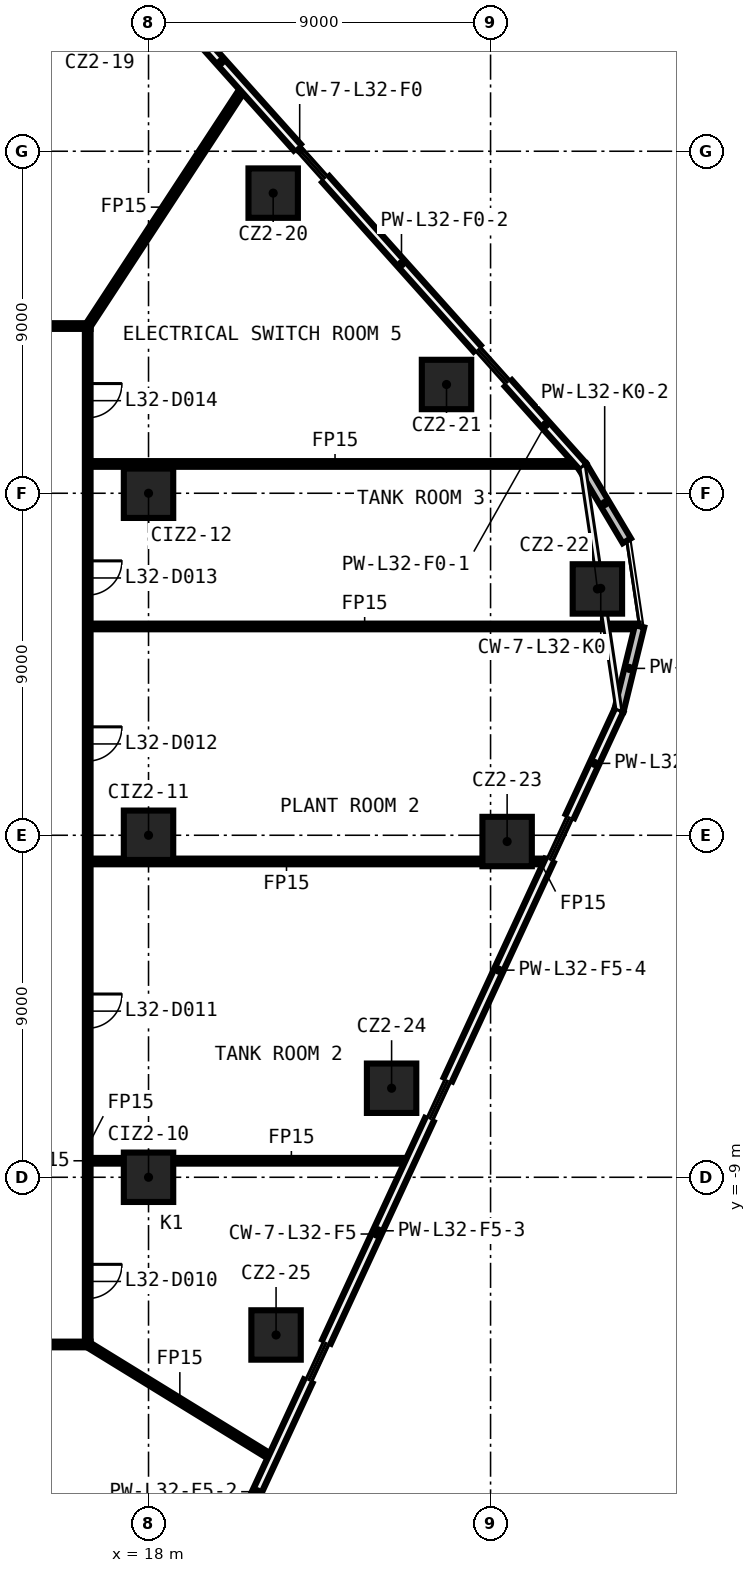
"""IFC4 building model, lengths in metres.
Left out: names, types, materials, properties, quantities, classifications, styles, units other than length and angle.
Written with IfcOpenShell. Run it as: python <this file> out.ifc"""

import sys

from ifc_helpers import new_model, si_unit, direction, frame, frame_2d, origin, origin_2d, place, context, subcontext, project, spatial, rectangle, extrude, element, fill, save


model = new_model("IFC4")
c1 = context("Model", 3, precision=1e-05, world=origin(), true_north=direction((0.0, 1.0)))
c2 = subcontext(c1, "Body", "Model", "MODEL_VIEW")
j1 = project(units=[si_unit("LENGTHUNIT", "METRE"), si_unit("PLANEANGLEUNIT", "RADIAN")], contexts=[c1])
p1 = place(None, origin())
s1 = spatial("IfcSite", under=j1, at=p1, CompositionType="ELEMENT")
p2 = place(p1, origin())
s2 = spatial("IfcBuilding", under=s1, at=p2, CompositionType="ELEMENT")
p3 = place(p2, frame((0.0, 0.0, 145.6)))
s3 = spatial("IfcBuildingStorey", under=s2, at=p3, CompositionType="ELEMENT", Elevation=145.6)
for number, where, z_axis, x_axis in (
    (1, (21.28, 16.898, 0.0), (0.0, 0.0, 1.0), (1.0, 0.0, 0.0)),
    (2, (25.841, 11.862, 0.0), (0.0, 0.0, 1.0), (1.0, 0.0, 0.0)),
    (3, (29.811, 6.482, 0.0), (0.0, 0.0, 1.0), (1.0, 0.0, 0.0)),
    (4, (27.436, -0.165, 0.0), (0.0, 0.0, 1.0), (1.0, 0.0, 0.0)),
    (5, (24.396, -6.657, 0.0), (0.0, 0.0, 1.0), (1.0, 0.0, 0.0)),
    (6, (21.356, -13.15, 0.0), (0.0, 0.0, 1.0), (1.0, 0.0, 0.0)),
    (7, (18.0, -9.0, 0.0), (0.0, 0.0, 1.0), (1.0, 0.0, 0.0)),
    (8, (18.0, 0.0, 0.0), (0.0, 0.0, 1.0), (1.0, 0.0, 0.0)),
    (9, (18.0, 9.0, 0.0), (0.0, 0.0, 1.0), (1.0, 0.0, 0.0)),
):
    element("IfcColumn", number, at=place(p3, frame(where, z_axis=z_axis, x_axis=x_axis)), inside=s3, PredefinedType="COLUMN", context=c2, shape_type="SweptSolid", body=[
        extrude(rectangle(XDim=1.3, YDim=1.3, at=origin_2d()), origin(), (0.0, 0.0, 1.0), 5.55),
    ])
p4 = place(p3, frame((16.475, -13.4, 0.0), z_axis=(0.0, 0.0, 1.0), x_axis=(-1.0, 0.0, 0.0)))
e10 = element("IfcWall", 10, at=p4, inside=s3, PredefinedType="PARTITIONING", context=c2, shape_type="SweptSolid", body=[
    extrude(rectangle(XDim=32.95, YDim=0.15, at=frame_2d((16.475, 0.0))), origin(), (0.0, 0.0, 1.0), 5.55),
])
p5 = place(p4, frame((29.678, 0.0, 0.0)))
e11 = element("IfcOpeningElement", 11, at=p5, cuts=e10, PredefinedType="OPENING", context=c2, shape_type="SweptSolid", body=[
    extrude(rectangle(XDim=0.9, YDim=2.1, at=frame_2d((0.45, 1.05))), frame((0.0, 0.085, 0.0), z_axis=(0.0, -1.0, 0.0), x_axis=(1.0, 0.0, 0.0)), (0.0, 0.0, 1.0), 0.17),
])
p6 = place(p4, frame((23.632, 0.0, 0.0)))
e12 = element("IfcOpeningElement", 12, at=p6, cuts=e10, PredefinedType="OPENING", context=c2, shape_type="SweptSolid", body=[
    extrude(rectangle(XDim=0.9, YDim=2.1, at=frame_2d((0.45, 1.05))), frame((0.0, 0.085, 0.0), z_axis=(0.0, -1.0, 0.0), x_axis=(1.0, 0.0, 0.0)), (0.0, 0.0, 1.0), 0.17),
])
p7 = place(p4, frame((19.232, 0.0, 0.0)))
e13 = element("IfcOpeningElement", 13, at=p7, cuts=e10, PredefinedType="OPENING", context=c2, shape_type="SweptSolid", body=[
    extrude(rectangle(XDim=0.9, YDim=2.1, at=frame_2d((0.45, 1.05))), frame((0.0, 0.085, 0.0), z_axis=(0.0, -1.0, 0.0), x_axis=(1.0, 0.0, 0.0)), (0.0, 0.0, 1.0), 0.17),
])
p8 = place(p4, frame((14.831, 0.0, 0.0)))
e14 = element("IfcOpeningElement", 14, at=p8, cuts=e10, PredefinedType="OPENING", context=c2, shape_type="SweptSolid", body=[
    extrude(rectangle(XDim=0.9, YDim=2.1, at=frame_2d((0.45, 1.05))), frame((0.0, 0.085, 0.0), z_axis=(0.0, -1.0, 0.0), x_axis=(1.0, 0.0, 0.0)), (0.0, 0.0, 1.0), 0.17),
])
p9 = place(p4, frame((10.43, 0.0, 0.0)))
e15 = element("IfcOpeningElement", 15, at=p9, cuts=e10, PredefinedType="OPENING", context=c2, shape_type="SweptSolid", body=[
    extrude(rectangle(XDim=0.9, YDim=2.1, at=frame_2d((0.45, 1.05))), frame((0.0, 0.085, 0.0), z_axis=(0.0, -1.0, 0.0), x_axis=(1.0, 0.0, 0.0)), (0.0, 0.0, 1.0), 0.17),
])
p10 = place(p4, frame((3.944, 0.0, 0.0)))
e16 = element("IfcOpeningElement", 16, at=p10, cuts=e10, PredefinedType="OPENING", context=c2, shape_type="SweptSolid", body=[
    extrude(rectangle(XDim=0.9, YDim=2.1, at=frame_2d((0.45, 1.05))), frame((0.0, 0.085, 0.0), z_axis=(0.0, -1.0, 0.0), x_axis=(1.0, 0.0, 0.0)), (0.0, 0.0, 1.0), 0.17),
])
p11 = place(p3, frame((16.475, -8.566, 0.0), z_axis=(0.0, 0.0, 1.0), x_axis=(1.0, 0.0, 0.0)))
e17 = element("IfcWall", 17, at=p11, inside=s3, PredefinedType="PARTITIONING", context=c2, shape_type="SweptSolid", body=[
    extrude(rectangle(XDim=0.875, YDim=0.15, at=frame_2d((0.438, 0.0))), origin(), (0.0, 0.0, 1.0), 5.55),
])
p12 = place(p3, frame((18.65, -8.566, 0.0), z_axis=(0.0, 0.0, 1.0), x_axis=(1.0, 0.0, 0.0)))
e18 = element("IfcWall", 18, at=p12, inside=s3, PredefinedType="PARTITIONING", context=c2, shape_type="SweptSolid", body=[
    extrude(rectangle(XDim=6.218, YDim=0.15, at=frame_2d((3.109, 0.0))), origin(), (0.0, 0.0, 1.0), 5.55),
])
p13 = place(p3, frame((16.475, -0.689, 0.0), z_axis=(0.0, 0.0, 1.0), x_axis=(1.0, 0.0, 0.0)))
e19 = element("IfcWall", 19, at=p13, inside=s3, PredefinedType="PARTITIONING", context=c2, shape_type="SweptSolid", body=[
    extrude(rectangle(XDim=10.311, YDim=0.15, at=frame_2d((5.155, 0.0))), origin(), (0.0, 0.0, 1.0), 5.55),
])
p14 = place(p3, frame((28.086, -0.689, 0.0), z_axis=(0.0, 0.0, 1.0), x_axis=(1.0, 0.0, 0.0)))
e20 = element("IfcWall", 20, at=p14, inside=s3, PredefinedType="PARTITIONING", context=c2, shape_type="SweptSolid", body=[
    extrude(rectangle(XDim=0.431, YDim=0.15, at=frame_2d((0.215, 0.0))), origin(), (0.0, 0.0, 1.0), 5.55),
])
p15 = place(p3, frame((16.475, 5.495, 0.0), z_axis=(0.0, 0.0, 1.0), x_axis=(1.0, 0.0, 0.0)))
e21 = element("IfcWall", 21, at=p15, inside=s3, PredefinedType="PARTITIONING", context=c2, shape_type="SweptSolid", body=[
    extrude(rectangle(XDim=14.424, YDim=0.15, at=frame_2d((7.212, 0.0))), origin(), (0.0, 0.0, 1.0), 5.55),
])
p16 = place(p3, frame((16.475, 9.771, 0.0), z_axis=(0.0, 0.0, 1.0), x_axis=(1.0, 0.0, 0.0)))
e22 = element("IfcWall", 22, at=p16, inside=s3, PredefinedType="PARTITIONING", context=c2, shape_type="SweptSolid", body=[
    extrude(rectangle(XDim=12.865, YDim=0.15, at=frame_2d((6.432, 0.0))), origin(), (0.0, 0.0, 1.0), 5.55),
])
p17 = place(p3, frame((-16.475, 13.4, 0.0), z_axis=(0.0, 0.0, 1.0), x_axis=(1.0, 0.0, 0.0)))
e23 = element("IfcWall", 23, at=p17, inside=s3, PredefinedType="PARTITIONING", context=c2, shape_type="SweptSolid", body=[
    extrude(rectangle(XDim=32.95, YDim=0.15, at=frame_2d((16.475, 0.0))), origin(), (0.0, 0.0, 1.0), 5.55),
])
p18 = place(p17, frame((30.036, 0.0, 0.0)))
e24 = element("IfcOpeningElement", 24, at=p18, cuts=e23, PredefinedType="OPENING", context=c2, shape_type="SweptSolid", body=[
    extrude(rectangle(XDim=0.9, YDim=2.1, at=frame_2d((0.45, 1.05))), frame((0.0, 0.085, 0.0), z_axis=(0.0, -1.0, 0.0), x_axis=(1.0, 0.0, 0.0)), (0.0, 0.0, 1.0), 0.17),
])
p19 = place(p17, frame((23.129, 0.0, 0.0)))
e25 = element("IfcOpeningElement", 25, at=p19, cuts=e23, PredefinedType="OPENING", context=c2, shape_type="SweptSolid", body=[
    extrude(rectangle(XDim=0.9, YDim=2.1, at=frame_2d((0.45, 1.05))), frame((0.0, 0.085, 0.0), z_axis=(0.0, -1.0, 0.0), x_axis=(1.0, 0.0, 0.0)), (0.0, 0.0, 1.0), 0.17),
])
p20 = place(p17, frame((17.059, 0.0, 0.0)))
e26 = element("IfcOpeningElement", 26, at=p20, cuts=e23, PredefinedType="OPENING", context=c2, shape_type="SweptSolid", body=[
    extrude(rectangle(XDim=0.9, YDim=2.1, at=frame_2d((0.45, 1.05))), frame((0.0, 0.085, 0.0), z_axis=(0.0, -1.0, 0.0), x_axis=(1.0, 0.0, 0.0)), (0.0, 0.0, 1.0), 0.17),
])
p21 = place(p17, frame((9.529, 0.0, 0.0)))
e27 = element("IfcOpeningElement", 27, at=p21, cuts=e23, PredefinedType="OPENING", context=c2, shape_type="SweptSolid", body=[
    extrude(rectangle(XDim=0.9, YDim=2.1, at=frame_2d((0.45, 1.05))), frame((0.0, 0.085, 0.0), z_axis=(0.0, -1.0, 0.0), x_axis=(1.0, 0.0, 0.0)), (0.0, 0.0, 1.0), 0.17),
])
p22 = place(p17, frame((6.62, 0.0, 0.0)))
e28 = element("IfcOpeningElement", 28, at=p22, cuts=e23, PredefinedType="OPENING", context=c2, shape_type="SweptSolid", body=[
    extrude(rectangle(XDim=0.9, YDim=2.1, at=frame_2d((0.45, 1.05))), frame((0.0, 0.085, 0.0), z_axis=(0.0, -1.0, 0.0), x_axis=(1.0, 0.0, 0.0)), (0.0, 0.0, 1.0), 0.17),
])
p23 = place(p17, frame((1.031, 0.0, 0.0)))
e29 = element("IfcOpeningElement", 29, at=p23, cuts=e23, PredefinedType="OPENING", context=c2, shape_type="SweptSolid", body=[
    extrude(rectangle(XDim=0.9, YDim=2.1, at=frame_2d((0.45, 1.05))), frame((0.0, 0.085, 0.0), z_axis=(0.0, -1.0, 0.0), x_axis=(1.0, 0.0, 0.0)), (0.0, 0.0, 1.0), 0.17),
])
p24 = place(p3, frame((16.4, 13.4, 0.0), z_axis=(0.0, 0.0, 1.0), x_axis=(0.547576489489, 0.836755632284, 0.0)))
e30 = element("IfcWall", 30, at=p24, inside=s3, PredefinedType="PARTITIONING", context=c2, shape_type="SweptSolid", body=[
    extrude(rectangle(XDim=7.479, YDim=0.15, at=frame_2d((3.74, 0.0))), origin(), (0.0, 0.0, 1.0), 5.55),
])
p25 = place(p3, frame((16.4, 13.325, 0.0), z_axis=(0.0, 0.0, 1.0), x_axis=(0.0, -1.0, 0.0)))
e31 = element("IfcWall", 31, at=p25, inside=s3, PredefinedType="PARTITIONING", context=c2, shape_type="SweptSolid", body=[
    extrude(rectangle(XDim=26.65, YDim=0.15, at=frame_2d((13.325, 0.0))), origin(), (0.0, 0.0, 1.0), 5.55),
])
p26 = place(p25, frame((24.616, 0.0, 0.0)))
e32 = element("IfcOpeningElement", 32, at=p26, cuts=e31, PredefinedType="OPENING", context=c2, shape_type="SweptSolid", body=[
    extrude(rectangle(XDim=0.9, YDim=2.1, at=frame_2d((0.45, 1.05))), frame((0.0, 0.085, 0.0), z_axis=(0.0, -1.0, 0.0), x_axis=(1.0, 0.0, 0.0)), (0.0, 0.0, 1.0), 0.17),
])
p27 = place(p25, frame((17.503, 0.0, 0.0)))
e33 = element("IfcOpeningElement", 33, at=p27, cuts=e31, PredefinedType="OPENING", context=c2, shape_type="SweptSolid", body=[
    extrude(rectangle(XDim=0.9, YDim=2.1, at=frame_2d((0.45, 1.05))), frame((0.0, 0.085, 0.0), z_axis=(0.0, -1.0, 0.0), x_axis=(1.0, 0.0, 0.0)), (0.0, 0.0, 1.0), 0.17),
])
p28 = place(p25, frame((10.472, 0.0, 0.0)))
e34 = element("IfcOpeningElement", 34, at=p28, cuts=e31, PredefinedType="OPENING", context=c2, shape_type="SweptSolid", body=[
    extrude(rectangle(XDim=0.9, YDim=2.1, at=frame_2d((0.45, 1.05))), frame((0.0, 0.085, 0.0), z_axis=(0.0, -1.0, 0.0), x_axis=(1.0, 0.0, 0.0)), (0.0, 0.0, 1.0), 0.17),
])
p29 = place(p25, frame((6.104, 0.0, 0.0)))
e35 = element("IfcOpeningElement", 35, at=p29, cuts=e31, PredefinedType="OPENING", context=c2, shape_type="SweptSolid", body=[
    extrude(rectangle(XDim=0.9, YDim=2.1, at=frame_2d((0.45, 1.05))), frame((0.0, 0.085, 0.0), z_axis=(0.0, -1.0, 0.0), x_axis=(1.0, 0.0, 0.0)), (0.0, 0.0, 1.0), 0.17),
])
p30 = place(p25, frame((1.438, 0.0, 0.0)))
e36 = element("IfcOpeningElement", 36, at=p30, cuts=e31, PredefinedType="OPENING", context=c2, shape_type="SweptSolid", body=[
    extrude(rectangle(XDim=0.9, YDim=2.1, at=frame_2d((0.45, 1.05))), frame((0.0, 0.085, 0.0), z_axis=(0.0, -1.0, 0.0), x_axis=(1.0, 0.0, 0.0)), (0.0, 0.0, 1.0), 0.17),
])
p31 = place(p3, frame((16.4, -13.4, 0.0), z_axis=(0.0, 0.0, 1.0), x_axis=(0.851901274015, -0.523702414861, 0.0)))
e37 = element("IfcWall", 37, at=p31, inside=s3, PredefinedType="PARTITIONING", context=c2, shape_type="SweptSolid", body=[
    extrude(rectangle(XDim=5.691, YDim=0.15, at=frame_2d((2.845, 0.0))), origin(), (0.0, 0.0, 1.0), 5.55),
])
p32 = place(p3, frame((30.378, 3.282, 0.0), z_axis=(0.0, 0.0, 1.0), x_axis=(0.237601077283, 0.971362819998, 0.0)))
e38 = element("IfcWall", 38, at=p32, inside=s3, PredefinedType="SOLIDWALL", context=c2, shape_type="SweptSolid", body=[
    extrude(rectangle(XDim=2.283, YDim=0.25, at=frame_2d((1.142, 0.0))), origin(), (0.0, 0.0, 1.0), 5.55),
])
p33 = place(p3, frame((30.586, 7.749, 0.0), z_axis=(0.0, 0.0, 1.0), x_axis=(-0.510543694861, 0.859851810277, 0.0)))
e39 = element("IfcWall", 39, at=p33, inside=s3, PredefinedType="SOLIDWALL", context=c2, shape_type="SweptSolid", body=[
    extrude(rectangle(XDim=2.283, YDim=0.25, at=frame_2d((1.142, 0.0))), origin(), (0.0, 0.0, 1.0), 5.55),
])
p34 = place(p3, frame((29.42, 9.712, 0.0), z_axis=(0.0, 0.0, 1.0), x_axis=(-0.666716813435, 0.74531113683, 0.0)))
e40 = element("IfcWall", 40, at=p34, inside=s3, PredefinedType="SOLIDWALL", context=c2, shape_type="SweptSolid", body=[
    extrude(rectangle(XDim=2.926, YDim=0.25, at=frame_2d((1.463, 0.0))), origin(), (0.0, 0.0, 1.0), 5.55),
])
p35 = place(p3, frame((26.648, 12.81, 0.0), z_axis=(0.0, 0.0, 1.0), x_axis=(-0.666711259846, 0.745316104747, 0.0)))
e41 = element("IfcWall", 41, at=p35, inside=s3, PredefinedType="SOLIDWALL", context=c2, shape_type="SweptSolid", body=[
    extrude(rectangle(XDim=5.976, YDim=0.25, at=frame_2d((2.988, 0.0))), origin(), (0.0, 0.0, 1.0), 5.55),
])
p36 = place(p3, frame((21.914, 18.103, 0.0), z_axis=(0.0, 0.0, 1.0), x_axis=(-0.666722592177, 0.745305967426, 0.0)))
e42 = element("IfcWall", 42, at=p36, inside=s3, PredefinedType="SOLIDWALL", context=c2, shape_type="SweptSolid", body=[
    extrude(rectangle(XDim=6.024, YDim=0.25, at=frame_2d((3.012, 0.0))), origin(), (0.0, 0.0, 1.0), 5.55),
])
p37 = place(p3, frame((19.511, -20.178, 0.0), z_axis=(0.0, 0.0, 1.0), x_axis=(0.420327741059, 0.907372354712, 0.0)))
e43 = element("IfcWall", 43, at=p37, inside=s3, PredefinedType="SOLIDWALL", context=c2, shape_type="SweptSolid", body=[
    extrude(rectangle(XDim=6.4, YDim=0.25, at=frame_2d((3.2, 0.0))), origin(), (0.0, 0.0, 1.0), 5.55),
])
p38 = place(p3, frame((22.685, -13.326, 0.0), z_axis=(0.0, 0.0, 1.0), x_axis=(0.420340604555, 0.907366395764, 0.0)))
e44 = element("IfcWall", 44, at=p38, inside=s3, PredefinedType="SOLIDWALL", context=c2, shape_type="SweptSolid", body=[
    extrude(rectangle(XDim=6.433, YDim=0.25, at=frame_2d((3.216, 0.0))), origin(), (0.0, 0.0, 1.0), 5.55),
])
p39 = place(p3, frame((25.881, -6.427, 0.0), z_axis=(0.0, 0.0, 1.0), x_axis=(0.420344294122, 0.907364686551, 0.0)))
e45 = element("IfcWall", 45, at=p39, inside=s3, PredefinedType="SOLIDWALL", context=c2, shape_type="SweptSolid", body=[
    extrude(rectangle(XDim=6.342, YDim=0.25, at=frame_2d((3.171, 0.0))), origin(), (0.0, 0.0, 1.0), 5.55),
])
p40 = place(p3, frame((29.091, 0.502, 0.0), z_axis=(0.0, 0.0, 1.0), x_axis=(0.420305824115, 0.907382507113, 0.0)))
e46 = element("IfcWall", 46, at=p40, inside=s3, PredefinedType="SOLIDWALL", context=c2, shape_type="SweptSolid", body=[
    extrude(rectangle(XDim=3.064, YDim=0.25, at=frame_2d((1.532, 0.0))), origin(), (0.0, 0.0, 1.0), 5.55),
])
p41 = place(p26, origin())
e47 = element("IfcDoor", 47, at=p41, inside=s3, OperationType="SINGLE_SWING_LEFT", PredefinedType="DOOR", context=c2, shape_type="SweptSolid", body=[
    extrude(rectangle(XDim=0.9, YDim=2.1, at=frame_2d((0.45, 1.05))), frame((0.0, 0.025, 0.0), z_axis=(0.0, -1.0, 0.0), x_axis=(1.0, 0.0, 0.0)), (0.0, 0.0, 1.0), 0.05),
])
fill(e32, e47)
p42 = place(p27, origin())
e48 = element("IfcDoor", 48, at=p42, inside=s3, OperationType="SINGLE_SWING_RIGHT", PredefinedType="DOOR", context=c2, shape_type="SweptSolid", body=[
    extrude(rectangle(XDim=0.9, YDim=2.1, at=frame_2d((0.45, 1.05))), frame((0.0, 0.025, 0.0), z_axis=(0.0, -1.0, 0.0), x_axis=(1.0, 0.0, 0.0)), (0.0, 0.0, 1.0), 0.05),
])
fill(e33, e48)
p43 = place(p28, origin())
e49 = element("IfcDoor", 49, at=p43, inside=s3, OperationType="SINGLE_SWING_LEFT", PredefinedType="DOOR", context=c2, shape_type="SweptSolid", body=[
    extrude(rectangle(XDim=0.9, YDim=2.1, at=frame_2d((0.45, 1.05))), frame((0.0, 0.025, 0.0), z_axis=(0.0, -1.0, 0.0), x_axis=(1.0, 0.0, 0.0)), (0.0, 0.0, 1.0), 0.05),
])
fill(e34, e49)
p44 = place(p29, origin())
e50 = element("IfcDoor", 50, at=p44, inside=s3, OperationType="SINGLE_SWING_RIGHT", PredefinedType="DOOR", context=c2, shape_type="SweptSolid", body=[
    extrude(rectangle(XDim=0.9, YDim=2.1, at=frame_2d((0.45, 1.05))), frame((0.0, 0.025, 0.0), z_axis=(0.0, -1.0, 0.0), x_axis=(1.0, 0.0, 0.0)), (0.0, 0.0, 1.0), 0.05),
])
fill(e35, e50)
p45 = place(p30, origin())
e51 = element("IfcDoor", 51, at=p45, inside=s3, OperationType="SINGLE_SWING_LEFT", PredefinedType="DOOR", context=c2, shape_type="SweptSolid", body=[
    extrude(rectangle(XDim=0.9, YDim=2.1, at=frame_2d((0.45, 1.05))), frame((0.0, 0.025, 0.0), z_axis=(0.0, -1.0, 0.0), x_axis=(1.0, 0.0, 0.0)), (0.0, 0.0, 1.0), 0.05),
])
fill(e36, e51)
save(model, sys.argv[1])
